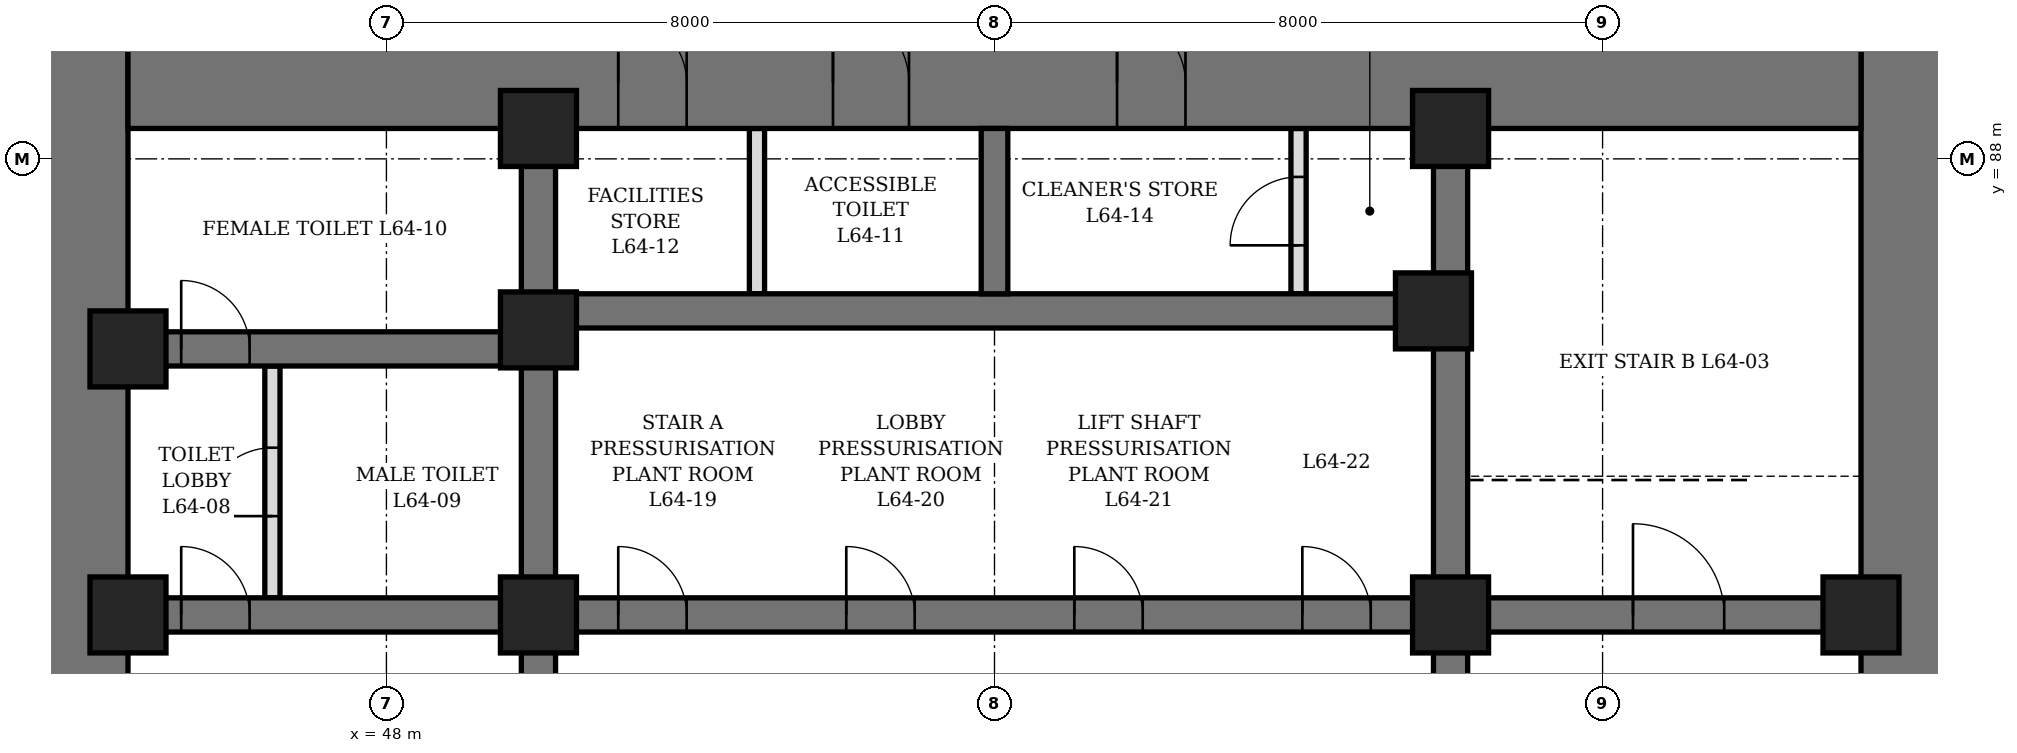
"""IFC4 building model, lengths in metres.
Left out: names, types, materials, properties, quantities, classifications, styles, units other than length and angle.
Written with IfcOpenShell. Run it as: python <this file> out.ifc"""

import sys

from ifc_helpers import new_model, si_unit, direction, frame, frame_2d, origin, origin_2d, place, context, subcontext, project, spatial, polyline, rectangle, hollow_rectangle, outline, extrude, element, fill, save


model = new_model("IFC4")
c1 = context("Model", 3, precision=1e-05, world=origin(), true_north=direction((0.0, 1.0)))
c2 = subcontext(c1, "Body", "Model", "MODEL_VIEW")
j1 = project(units=[si_unit("LENGTHUNIT", "METRE"), si_unit("PLANEANGLEUNIT", "RADIAN")], contexts=[c1])
p1 = place(None, origin())
s1 = spatial("IfcSite", under=j1, at=p1, CompositionType="ELEMENT")
p2 = place(p1, origin())
s2 = spatial("IfcBuilding", under=s1, at=p2, CompositionType="ELEMENT")
p3 = place(p2, frame((0.0, 0.0, 285.7)))
s3 = spatial("IfcBuildingStorey", under=s2, at=p3, CompositionType="ELEMENT", Elevation=285.7)
p4 = place(p3, frame((44.0, 70.4, 0.0), z_axis=(0.0, 0.0, 1.0), x_axis=(0.0, 1.0, 0.0)))
e1 = element("IfcWall", 1, at=p4, inside=s3, PredefinedType="SHEAR", context=c2, shape_type="SweptSolid", body=[
    extrude(outline(polyline([(0.0, 0.0), (19.2, 0.0), (19.2, 16.743), (0.0, 9.537), (0.0, 0.0)])), frame((0.0, 0.6, 0.0), z_axis=(0.0, -1.0, 0.0), x_axis=(1.0, 0.0, 0.0)), (0.0, 0.0, 1.0), 1.2),
])
p5 = place(p4, frame((8.6, 0.0, 0.0)))
e2 = element("IfcOpeningElement", 2, at=p5, cuts=e1, PredefinedType="OPENING", context=c2, shape_type="SweptSolid", body=[
    extrude(rectangle(XDim=2.0, YDim=2.4, at=frame_2d((1.0, 1.2))), frame((0.0, 0.61, 0.0), z_axis=(0.0, -1.0, 0.0), x_axis=(1.0, 0.0, 0.0)), (0.0, 0.0, 1.0), 1.22),
])
p6 = place(p3, frame((68.0, 70.4, 0.0), z_axis=(0.0, 0.0, 1.0), x_axis=(0.0, 1.0, 0.0)))
e3 = element("IfcWall", 3, at=p6, inside=s3, PredefinedType="SHEAR", context=c2, shape_type="SweptSolid", body=[
    extrude(outline(polyline([(0.0, 0.0), (19.2, 0.0), (19.2, 16.743), (0.0, 9.537), (0.0, 0.0)])), frame((0.0, 0.6, 0.0), z_axis=(0.0, -1.0, 0.0), x_axis=(1.0, 0.0, 0.0)), (0.0, 0.0, 1.0), 1.2),
])
p7 = place(p6, frame((8.6, 0.0, 0.0)))
e4 = element("IfcOpeningElement", 4, at=p7, cuts=e3, PredefinedType="OPENING", context=c2, shape_type="SweptSolid", body=[
    extrude(rectangle(XDim=2.0, YDim=2.4, at=frame_2d((1.0, 1.2))), frame((0.0, 0.61, 0.0), z_axis=(0.0, -1.0, 0.0), x_axis=(1.0, 0.0, 0.0)), (0.0, 0.0, 1.0), 1.22),
])
p8 = place(p3, frame((44.6, 89.0, 0.0), z_axis=(0.0, 0.0, 1.0), x_axis=(1.0, 0.0, 0.0)))
e5 = element("IfcWall", 5, at=p8, inside=s3, PredefinedType="SHEAR", context=c2, shape_type="SweptSolid", body=[
    extrude(outline(polyline([(0.0, 0.0), (22.8, 0.0), (22.8, 16.293), (0.0, 16.293), (0.0, 0.0)])), frame((0.0, 0.6, 0.0), z_axis=(0.0, -1.0, 0.0), x_axis=(1.0, 0.0, 0.0)), (0.0, 0.0, 1.0), 1.2),
])
p9 = place(p8, frame((9.275, 0.0, 0.0)))
e6 = element("IfcOpeningElement", 6, at=p9, cuts=e5, PredefinedType="OPENING", context=c2, shape_type="SweptSolid", body=[
    extrude(rectangle(XDim=1.0, YDim=2.1, at=frame_2d((0.5, 1.05))), frame((0.0, 0.61, 0.0), z_axis=(0.0, -1.0, 0.0), x_axis=(1.0, 0.0, 0.0)), (0.0, 0.0, 1.0), 1.22),
])
p10 = place(p8, frame((6.45, 0.0, 0.0)))
e7 = element("IfcOpeningElement", 7, at=p10, cuts=e5, PredefinedType="OPENING", context=c2, shape_type="SweptSolid", body=[
    extrude(rectangle(XDim=0.9, YDim=2.1, at=frame_2d((0.45, 1.05))), frame((0.0, 0.61, 0.0), z_axis=(0.0, -1.0, 0.0), x_axis=(1.0, 0.0, 0.0)), (0.0, 0.0, 1.0), 1.22),
])
p11 = place(p8, frame((13.012, 0.0, 0.0)))
e8 = element("IfcOpeningElement", 8, at=p11, cuts=e5, PredefinedType="OPENING", context=c2, shape_type="SweptSolid", body=[
    extrude(rectangle(XDim=0.9, YDim=2.1, at=frame_2d((0.45, 1.05))), frame((0.0, 0.61, 0.0), z_axis=(0.0, -1.0, 0.0), x_axis=(1.0, 0.0, 0.0)), (0.0, 0.0, 1.0), 1.22),
])
p12 = place(p3, frame((50.0, 71.6, 0.0), z_axis=(0.0, 0.0, 1.0), x_axis=(0.0, 1.0, 0.0)))
e9 = element("IfcWall", 9, at=p12, inside=s3, PredefinedType="SHEAR", context=c2, shape_type="SweptSolid", body=[
    extrude(outline(polyline([(0.0, 0.0), (16.8, 0.0), (16.8, 16.293), (0.0, 9.987), (0.0, 0.0)])), frame((0.0, 0.225, 0.0), z_axis=(0.0, -1.0, 0.0), x_axis=(1.0, 0.0, 0.0)), (0.0, 0.0, 1.0), 0.45),
])
p13 = place(p12, frame((7.5, 0.0, 0.0)))
e10 = element("IfcOpeningElement", 10, at=p13, cuts=e9, PredefinedType="OPENING", context=c2, shape_type="SweptSolid", body=[
    extrude(rectangle(XDim=1.8, YDim=2.4, at=frame_2d((0.9, 1.2))), frame((0.0, 0.235, 0.0), z_axis=(0.0, -1.0, 0.0), x_axis=(1.0, 0.0, 0.0)), (0.0, 0.0, 1.0), 0.47),
])
p14 = place(p3, frame((62.0, 71.6, 0.0), z_axis=(0.0, 0.0, 1.0), x_axis=(0.0, 1.0, 0.0)))
e11 = element("IfcWall", 11, at=p14, inside=s3, PredefinedType="SHEAR", context=c2, shape_type="SweptSolid", body=[
    extrude(outline(polyline([(0.0, 0.0), (16.8, 0.0), (16.8, 16.293), (0.0, 9.987), (0.0, 0.0)])), frame((0.0, 0.225, 0.0), z_axis=(0.0, -1.0, 0.0), x_axis=(1.0, 0.0, 0.0)), (0.0, 0.0, 1.0), 0.45),
])
p15 = place(p14, frame((7.5, 0.0, 0.0)))
e12 = element("IfcOpeningElement", 12, at=p15, cuts=e11, PredefinedType="OPENING", context=c2, shape_type="SweptSolid", body=[
    extrude(rectangle(XDim=1.8, YDim=2.4, at=frame_2d((0.9, 1.2))), frame((0.0, 0.235, 0.0), z_axis=(0.0, -1.0, 0.0), x_axis=(1.0, 0.0, 0.0)), (0.0, 0.0, 1.0), 0.47),
])
p16 = place(p3, frame((44.6, 82.0, 0.0), z_axis=(0.0, 0.0, 1.0), x_axis=(1.0, 0.0, 0.0)))
e13 = element("IfcWall", 13, at=p16, inside=s3, PredefinedType="SHEAR", context=c2, shape_type="SweptSolid", body=[
    extrude(outline(polyline([(0.0, 0.0), (5.175, 0.0), (5.175, 13.806), (0.0, 13.806), (0.0, 0.0)])), frame((0.0, 0.225, 0.0), z_axis=(0.0, -1.0, 0.0), x_axis=(1.0, 0.0, 0.0)), (0.0, 0.0, 1.0), 0.45),
])
p17 = place(p16, frame((0.7, 0.0, 0.0)))
e14 = element("IfcOpeningElement", 14, at=p17, cuts=e13, PredefinedType="OPENING", context=c2, shape_type="SweptSolid", body=[
    extrude(rectangle(XDim=0.9, YDim=2.1, at=frame_2d((0.45, 1.05))), frame((0.0, 0.235, 0.0), z_axis=(0.0, -1.0, 0.0), x_axis=(1.0, 0.0, 0.0)), (0.0, 0.0, 1.0), 0.47),
])
p18 = place(p3, frame((44.6, 85.5, 0.0), z_axis=(0.0, 0.0, 1.0), x_axis=(1.0, 0.0, 0.0)))
e15 = element("IfcWall", 15, at=p18, inside=s3, PredefinedType="SHEAR", context=c2, shape_type="SweptSolid", body=[
    extrude(outline(polyline([(0.0, 0.0), (5.175, 0.0), (5.175, 15.12), (0.0, 15.12), (0.0, 0.0)])), frame((0.0, 0.225, 0.0), z_axis=(0.0, -1.0, 0.0), x_axis=(1.0, 0.0, 0.0)), (0.0, 0.0, 1.0), 0.45),
])
p19 = place(p18, frame((0.7, 0.0, 0.0)))
e16 = element("IfcOpeningElement", 16, at=p19, cuts=e15, PredefinedType="OPENING", context=c2, shape_type="SweptSolid", body=[
    extrude(rectangle(XDim=0.9, YDim=2.1, at=frame_2d((0.45, 1.05))), frame((0.0, 0.235, 0.0), z_axis=(0.0, -1.0, 0.0), x_axis=(1.0, 0.0, 0.0)), (0.0, 0.0, 1.0), 0.47),
])
p20 = place(p3, frame((62.225, 82.0, 0.0), z_axis=(0.0, 0.0, 1.0), x_axis=(1.0, 0.0, 0.0)))
e17 = element("IfcWall", 17, at=p20, inside=s3, PredefinedType="SHEAR", context=c2, shape_type="SweptSolid", body=[
    extrude(outline(polyline([(0.0, 0.0), (5.175, 0.0), (5.175, 13.806), (0.0, 13.806), (0.0, 0.0)])), frame((0.0, 0.225, 0.0), z_axis=(0.0, -1.0, 0.0), x_axis=(1.0, 0.0, 0.0)), (0.0, 0.0, 1.0), 0.45),
])
p21 = place(p20, frame((2.175, 0.0, 0.0)))
e18 = element("IfcOpeningElement", 18, at=p21, cuts=e17, PredefinedType="OPENING", context=c2, shape_type="SweptSolid", body=[
    extrude(rectangle(XDim=1.2, YDim=2.1, at=frame_2d((0.6, 1.05))), frame((0.0, 0.235, 0.0), z_axis=(0.0, -1.0, 0.0), x_axis=(1.0, 0.0, 0.0)), (0.0, 0.0, 1.0), 0.47),
])
p22 = place(p3, frame((50.225, 82.0, 0.0), z_axis=(0.0, 0.0, 1.0), x_axis=(1.0, 0.0, 0.0)))
e19 = element("IfcWall", 19, at=p22, inside=s3, PredefinedType="SHEAR", context=c2, shape_type="SweptSolid", body=[
    extrude(outline(polyline([(0.0, 0.0), (11.55, 0.0), (11.55, 13.806), (0.0, 13.806), (0.0, 0.0)])), frame((0.0, 0.225, 0.0), z_axis=(0.0, -1.0, 0.0), x_axis=(1.0, 0.0, 0.0)), (0.0, 0.0, 1.0), 0.45),
])
p23 = place(p22, frame((0.825, 0.0, 0.0)))
e20 = element("IfcOpeningElement", 20, at=p23, cuts=e19, PredefinedType="OPENING", context=c2, shape_type="SweptSolid", body=[
    extrude(rectangle(XDim=0.9, YDim=2.1, at=frame_2d((0.45, 1.05))), frame((0.0, 0.235, 0.0), z_axis=(0.0, -1.0, 0.0), x_axis=(1.0, 0.0, 0.0)), (0.0, 0.0, 1.0), 0.47),
])
p24 = place(p22, frame((3.825, 0.0, 0.0)))
e21 = element("IfcOpeningElement", 21, at=p24, cuts=e19, PredefinedType="OPENING", context=c2, shape_type="SweptSolid", body=[
    extrude(rectangle(XDim=0.9, YDim=2.1, at=frame_2d((0.45, 1.05))), frame((0.0, 0.235, 0.0), z_axis=(0.0, -1.0, 0.0), x_axis=(1.0, 0.0, 0.0)), (0.0, 0.0, 1.0), 0.47),
])
p25 = place(p22, frame((6.825, 0.0, 0.0)))
e22 = element("IfcOpeningElement", 22, at=p25, cuts=e19, PredefinedType="OPENING", context=c2, shape_type="SweptSolid", body=[
    extrude(rectangle(XDim=0.9, YDim=2.1, at=frame_2d((0.45, 1.05))), frame((0.0, 0.235, 0.0), z_axis=(0.0, -1.0, 0.0), x_axis=(1.0, 0.0, 0.0)), (0.0, 0.0, 1.0), 0.47),
])
p26 = place(p22, frame((9.825, 0.0, 0.0)))
e23 = element("IfcOpeningElement", 23, at=p26, cuts=e19, PredefinedType="OPENING", context=c2, shape_type="SweptSolid", body=[
    extrude(rectangle(XDim=0.9, YDim=2.1, at=frame_2d((0.45, 1.05))), frame((0.0, 0.235, 0.0), z_axis=(0.0, -1.0, 0.0), x_axis=(1.0, 0.0, 0.0)), (0.0, 0.0, 1.0), 0.47),
])
p27 = place(p3, frame((50.225, 86.0, 0.0), z_axis=(0.0, 0.0, 1.0), x_axis=(1.0, 0.0, 0.0)))
e24 = element("IfcWall", 24, at=p27, inside=s3, PredefinedType="SHEAR", context=c2, shape_type="SweptSolid", body=[
    extrude(outline(polyline([(0.0, 0.0), (11.55, 0.0), (11.55, 15.307), (0.0, 15.307), (0.0, 0.0)])), frame((0.0, 0.225, 0.0), z_axis=(0.0, -1.0, 0.0), x_axis=(1.0, 0.0, 0.0)), (0.0, 0.0, 1.0), 0.45),
])
p28 = place(p3, frame((56.0, 86.225, 0.0), z_axis=(0.0, 0.0, 1.0), x_axis=(0.0, 1.0, 0.0)))
e25 = element("IfcWall", 25, at=p28, inside=s3, PredefinedType="SHEAR", context=c2, shape_type="SweptSolid", body=[
    extrude(outline(polyline([(0.0, 0.0), (2.175, 0.0), (2.175, 16.293), (0.0, 15.476), (0.0, 0.0)])), frame((0.0, 0.175, 0.0), z_axis=(0.0, -1.0, 0.0), x_axis=(1.0, 0.0, 0.0)), (0.0, 0.0, 1.0), 0.35),
])
p29 = place(p3, frame((44.6, 82.0, 0.0), z_axis=(0.0, 0.0, 1.0), x_axis=(1.0, 0.0, 0.0)))
e26 = element("IfcColumn", 26, at=p29, inside=s3, PredefinedType="COLUMN", context=c2, shape_type="SweptSolid", body=[
    extrude(hollow_rectangle(XDim=1.0, YDim=1.0, WallThickness=0.15, at=origin_2d()), origin(), (0.0, 0.0, 1.0), 13.703),
])
p30 = place(p3, frame((44.6, 85.5, 0.0), z_axis=(0.0, 0.0, 1.0), x_axis=(1.0, 0.0, 0.0)))
e27 = element("IfcColumn", 27, at=p30, inside=s3, PredefinedType="COLUMN", context=c2, shape_type="SweptSolid", body=[
    extrude(hollow_rectangle(XDim=1.0, YDim=1.0, WallThickness=0.15, at=origin_2d()), origin(), (0.0, 0.0, 1.0), 15.017),
])
p31 = place(p3, frame((50.0, 82.0, 0.0), z_axis=(0.0, 0.0, 1.0), x_axis=(1.0, 0.0, 0.0)))
e28 = element("IfcColumn", 28, at=p31, inside=s3, PredefinedType="COLUMN", context=c2, shape_type="SweptSolid", body=[
    extrude(hollow_rectangle(XDim=1.0, YDim=1.0, WallThickness=0.15, at=origin_2d()), origin(), (0.0, 0.0, 1.0), 13.703),
])
p32 = place(p3, frame((50.0, 85.75, 0.0), z_axis=(0.0, 0.0, 1.0), x_axis=(1.0, 0.0, 0.0)))
e29 = element("IfcColumn", 29, at=p32, inside=s3, PredefinedType="COLUMN", context=c2, shape_type="SweptSolid", body=[
    extrude(hollow_rectangle(XDim=1.0, YDim=1.0, WallThickness=0.15, at=origin_2d()), origin(), (0.0, 0.0, 1.0), 15.11),
])
p33 = place(p3, frame((50.0, 88.4, 0.0), z_axis=(0.0, 0.0, 1.0), x_axis=(1.0, 0.0, 0.0)))
e30 = element("IfcColumn", 30, at=p33, inside=s3, PredefinedType="COLUMN", context=c2, shape_type="SweptSolid", body=[
    extrude(hollow_rectangle(XDim=1.0, YDim=1.0, WallThickness=0.15, at=origin_2d()), origin(), (0.0, 0.0, 1.0), 16.105),
])
p34 = place(p3, frame((61.775, 86.0, 0.0), z_axis=(0.0, 0.0, 1.0), x_axis=(1.0, 0.0, 0.0)))
e31 = element("IfcColumn", 31, at=p34, inside=s3, PredefinedType="COLUMN", context=c2, shape_type="SweptSolid", body=[
    extrude(hollow_rectangle(XDim=1.0, YDim=1.0, WallThickness=0.15, at=origin_2d()), origin(), (0.0, 0.0, 1.0), 15.204),
])
p35 = place(p3, frame((62.0, 82.0, 0.0), z_axis=(0.0, 0.0, 1.0), x_axis=(1.0, 0.0, 0.0)))
e32 = element("IfcColumn", 32, at=p35, inside=s3, PredefinedType="COLUMN", context=c2, shape_type="SweptSolid", body=[
    extrude(hollow_rectangle(XDim=1.0, YDim=1.0, WallThickness=0.15, at=origin_2d()), origin(), (0.0, 0.0, 1.0), 13.703),
])
p36 = place(p3, frame((62.0, 88.4, 0.0), z_axis=(0.0, 0.0, 1.0), x_axis=(1.0, 0.0, 0.0)))
e33 = element("IfcColumn", 33, at=p36, inside=s3, PredefinedType="COLUMN", context=c2, shape_type="SweptSolid", body=[
    extrude(hollow_rectangle(XDim=1.0, YDim=1.0, WallThickness=0.15, at=origin_2d()), origin(), (0.0, 0.0, 1.0), 16.105),
])
p37 = place(p3, frame((67.4, 82.0, 0.0), z_axis=(0.0, 0.0, 1.0), x_axis=(1.0, 0.0, 0.0)))
e34 = element("IfcColumn", 34, at=p37, inside=s3, PredefinedType="COLUMN", context=c2, shape_type="SweptSolid", body=[
    extrude(hollow_rectangle(XDim=1.0, YDim=1.0, WallThickness=0.15, at=origin_2d()), origin(), (0.0, 0.0, 1.0), 13.703),
])
p38 = place(p3, frame((46.5, 82.225, 0.0), z_axis=(0.0, 0.0, 1.0), x_axis=(0.0, 1.0, 0.0)))
e35 = element("IfcWall", 35, at=p38, inside=s3, PredefinedType="PARTITIONING", context=c2, shape_type="SweptSolid", body=[
    extrude(rectangle(XDim=3.05, YDim=0.2, at=frame_2d((1.525, 0.0))), origin(), (0.0, 0.0, 1.0), 8.0),
])
p39 = place(p38, frame((1.075, 0.0, 0.0)))
e36 = element("IfcOpeningElement", 36, at=p39, cuts=e35, PredefinedType="OPENING", context=c2, shape_type="SweptSolid", body=[
    extrude(rectangle(XDim=0.9, YDim=2.1, at=frame_2d((0.45, 1.05))), frame((0.0, 0.11, 0.0), z_axis=(0.0, -1.0, 0.0), x_axis=(1.0, 0.0, 0.0)), (0.0, 0.0, 1.0), 0.22),
])
p40 = place(p3, frame((52.875, 86.225, 0.0), z_axis=(0.0, 0.0, 1.0), x_axis=(0.0, 1.0, 0.0)))
e37 = element("IfcWall", 37, at=p40, inside=s3, PredefinedType="PARTITIONING", context=c2, shape_type="SweptSolid", body=[
    extrude(rectangle(XDim=2.175, YDim=0.2, at=frame_2d((1.087, 0.0))), origin(), (0.0, 0.0, 1.0), 8.0),
])
p41 = place(p3, frame((60.0, 86.225, 0.0), z_axis=(0.0, 0.0, 1.0), x_axis=(0.0, 1.0, 0.0)))
e38 = element("IfcWall", 38, at=p41, inside=s3, PredefinedType="PARTITIONING", context=c2, shape_type="SweptSolid", body=[
    extrude(rectangle(XDim=2.175, YDim=0.2, at=frame_2d((1.087, 0.0))), origin(), (0.0, 0.0, 1.0), 8.0),
])
p42 = place(p41, frame((0.637, 0.0, 0.0)))
e39 = element("IfcOpeningElement", 39, at=p42, cuts=e38, PredefinedType="OPENING", context=c2, shape_type="SweptSolid", body=[
    extrude(rectangle(XDim=0.9, YDim=2.1, at=frame_2d((0.45, 1.05))), frame((0.0, 0.11, 0.0), z_axis=(0.0, -1.0, 0.0), x_axis=(1.0, 0.0, 0.0)), (0.0, 0.0, 1.0), 0.22),
])
p43 = place(p17, origin())
e40 = element("IfcDoor", 40, at=p43, inside=s3, OperationType="SINGLE_SWING_LEFT", PredefinedType="DOOR", context=c2, shape_type="SweptSolid", body=[
    extrude(rectangle(XDim=0.9, YDim=2.1, at=frame_2d((0.45, 1.05))), frame((0.0, 0.225, 0.0), z_axis=(0.0, -1.0, 0.0), x_axis=(1.0, 0.0, 0.0)), (0.0, 0.0, 1.0), 0.449),
])
fill(e14, e40)
p44 = place(p39, origin())
e41 = element("IfcDoor", 41, at=p44, inside=s3, OperationType="SINGLE_SWING_RIGHT", PredefinedType="DOOR", context=c2, shape_type="SweptSolid", body=[
    extrude(rectangle(XDim=0.9, YDim=2.1, at=frame_2d((0.45, 1.05))), frame((0.0, 0.1, 0.0), z_axis=(0.0, -1.0, 0.0), x_axis=(1.0, 0.0, 0.0)), (0.0, 0.0, 1.0), 0.199),
])
fill(e36, e41)
p45 = place(p19, origin())
e42 = element("IfcDoor", 42, at=p45, inside=s3, OperationType="SINGLE_SWING_RIGHT", PredefinedType="DOOR", context=c2, shape_type="SweptSolid", body=[
    extrude(rectangle(XDim=0.9, YDim=2.1, at=frame_2d((0.45, 1.05))), frame((0.0, 0.225, 0.0), z_axis=(0.0, -1.0, 0.0), x_axis=(1.0, 0.0, 0.0)), (0.0, 0.0, 1.0), 0.449),
])
fill(e16, e42)
p46 = place(p9, origin())
e43 = element("IfcDoor", 43, at=p46, inside=s3, OperationType="SINGLE_SWING_LEFT", PredefinedType="DOOR", context=c2, shape_type="SweptSolid", body=[
    extrude(rectangle(XDim=1.0, YDim=2.1, at=frame_2d((0.5, 1.05))), frame((0.0, 0.35, 0.0), z_axis=(0.0, -1.0, 0.0), x_axis=(1.0, 0.0, 0.0)), (0.0, 0.0, 1.0), 0.7),
])
fill(e6, e43)
p47 = place(p10, origin())
e44 = element("IfcDoor", 44, at=p47, inside=s3, OperationType="SINGLE_SWING_LEFT", PredefinedType="DOOR", context=c2, shape_type="SweptSolid", body=[
    extrude(rectangle(XDim=0.9, YDim=2.1, at=frame_2d((0.45, 1.05))), frame((0.0, 0.35, 0.0), z_axis=(0.0, -1.0, 0.0), x_axis=(1.0, 0.0, 0.0)), (0.0, 0.0, 1.0), 0.7),
])
fill(e7, e44)
p48 = place(p11, origin())
e45 = element("IfcDoor", 45, at=p48, inside=s3, OperationType="SINGLE_SWING_LEFT", PredefinedType="DOOR", context=c2, shape_type="SweptSolid", body=[
    extrude(rectangle(XDim=0.9, YDim=2.1, at=frame_2d((0.45, 1.05))), frame((0.0, 0.35, 0.0), z_axis=(0.0, -1.0, 0.0), x_axis=(1.0, 0.0, 0.0)), (0.0, 0.0, 1.0), 0.7),
])
fill(e8, e45)
p49 = place(p42, origin())
e46 = element("IfcDoor", 46, at=p49, inside=s3, OperationType="SINGLE_SWING_LEFT", PredefinedType="DOOR", context=c2, shape_type="SweptSolid", body=[
    extrude(rectangle(XDim=0.9, YDim=2.1, at=frame_2d((0.45, 1.05))), frame((0.0, 0.1, 0.0), z_axis=(0.0, -1.0, 0.0), x_axis=(1.0, 0.0, 0.0)), (0.0, 0.0, 1.0), 0.199),
])
fill(e39, e46)
p50 = place(p23, origin())
e47 = element("IfcDoor", 47, at=p50, inside=s3, OperationType="SINGLE_SWING_LEFT", PredefinedType="DOOR", context=c2, shape_type="SweptSolid", body=[
    extrude(rectangle(XDim=0.9, YDim=2.1, at=frame_2d((0.45, 1.05))), frame((0.0, 0.225, 0.0), z_axis=(0.0, -1.0, 0.0), x_axis=(1.0, 0.0, 0.0)), (0.0, 0.0, 1.0), 0.449),
])
fill(e20, e47)
p51 = place(p24, origin())
e48 = element("IfcDoor", 48, at=p51, inside=s3, OperationType="SINGLE_SWING_LEFT", PredefinedType="DOOR", context=c2, shape_type="SweptSolid", body=[
    extrude(rectangle(XDim=0.9, YDim=2.1, at=frame_2d((0.45, 1.05))), frame((0.0, 0.225, 0.0), z_axis=(0.0, -1.0, 0.0), x_axis=(1.0, 0.0, 0.0)), (0.0, 0.0, 1.0), 0.449),
])
fill(e21, e48)
p52 = place(p25, origin())
e49 = element("IfcDoor", 49, at=p52, inside=s3, OperationType="SINGLE_SWING_LEFT", PredefinedType="DOOR", context=c2, shape_type="SweptSolid", body=[
    extrude(rectangle(XDim=0.9, YDim=2.1, at=frame_2d((0.45, 1.05))), frame((0.0, 0.225, 0.0), z_axis=(0.0, -1.0, 0.0), x_axis=(1.0, 0.0, 0.0)), (0.0, 0.0, 1.0), 0.449),
])
fill(e22, e49)
p53 = place(p26, origin())
e50 = element("IfcDoor", 50, at=p53, inside=s3, OperationType="SINGLE_SWING_LEFT", PredefinedType="DOOR", context=c2, shape_type="SweptSolid", body=[
    extrude(rectangle(XDim=0.9, YDim=2.1, at=frame_2d((0.45, 1.05))), frame((0.0, 0.225, 0.0), z_axis=(0.0, -1.0, 0.0), x_axis=(1.0, 0.0, 0.0)), (0.0, 0.0, 1.0), 0.449),
])
fill(e23, e50)
p54 = place(p21, origin())
e51 = element("IfcDoor", 51, at=p54, inside=s3, OperationType="SINGLE_SWING_LEFT", PredefinedType="DOOR", context=c2, shape_type="SweptSolid", body=[
    extrude(rectangle(XDim=1.2, YDim=2.1, at=frame_2d((0.6, 1.05))), frame((0.0, 0.225, 0.0), z_axis=(0.0, -1.0, 0.0), x_axis=(1.0, 0.0, 0.0)), (0.0, 0.0, 1.0), 0.449),
])
fill(e18, e51)
save(model, sys.argv[1])
